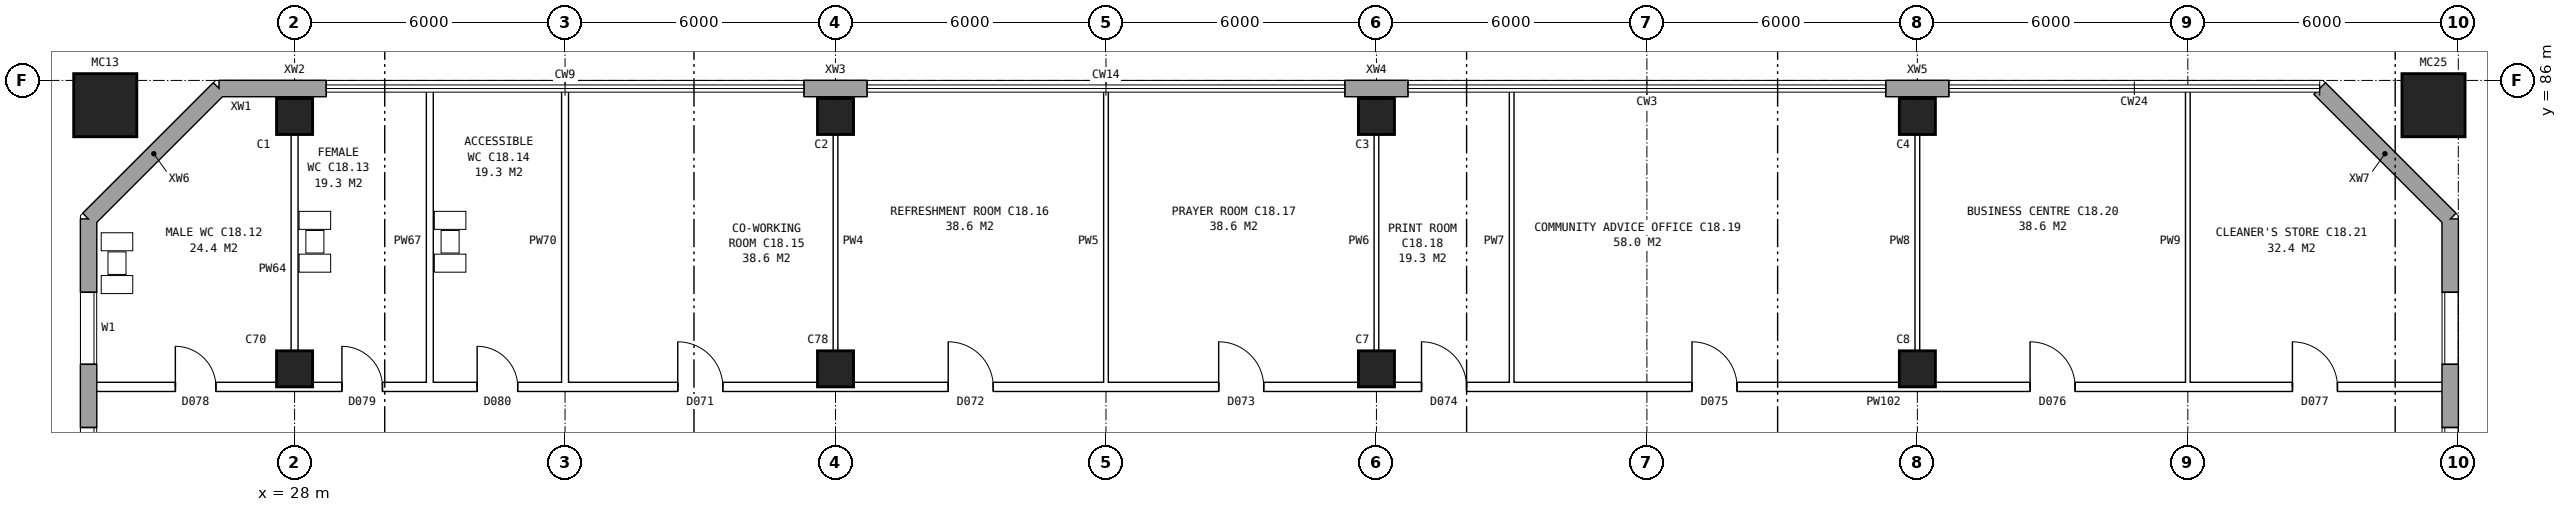
"""IFC4 building model, lengths in metres.
Left out: names, types, materials, properties, quantities, classifications, styles, units other than length and angle.
Written with IfcOpenShell. Run it as: python <this file> out.ifc"""

import sys

from ifc_helpers import new_model, si_unit, direction, frame, frame_2d, origin, origin_2d, place, context, subcontext, project, spatial, rectangle, hollow_rectangle, extrude, element, fill, save


model = new_model("IFC4")
c1 = context("Model", 3, precision=1e-05, world=origin(), true_north=direction((0.0, 1.0)))
c2 = subcontext(c1, "Body", "Model", "MODEL_VIEW")
j1 = project(units=[si_unit("LENGTHUNIT", "METRE"), si_unit("PLANEANGLEUNIT", "RADIAN")], contexts=[c1])
p1 = place(None, origin())
s1 = spatial("IfcSite", under=j1, at=p1, CompositionType="ELEMENT")
p2 = place(p1, origin())
s2 = spatial("IfcBuilding", under=s1, at=p2, CompositionType="ELEMENT")
p3 = place(p2, frame((0.0, 0.0, 67.4)))
s3 = spatial("IfcBuildingStorey", under=s2, at=p3, CompositionType="ELEMENT", Elevation=67.4)
for number, where, z_axis, x_axis in (
    (1, (28.0, 79.6, 0.0), (0.0, 0.0, 1.0), (1.0, 0.0, 0.0)),
    (2, (28.0, 85.2, 0.0), (0.0, 0.0, 1.0), (1.0, 0.0, 0.0)),
    (3, (40.0, 79.6, 0.0), (0.0, 0.0, 1.0), (1.0, 0.0, 0.0)),
    (4, (40.0, 85.2, 0.0), (0.0, 0.0, 1.0), (1.0, 0.0, 0.0)),
    (5, (52.0, 79.6, 0.0), (0.0, 0.0, 1.0), (1.0, 0.0, 0.0)),
    (6, (52.0, 85.2, 0.0), (0.0, 0.0, 1.0), (1.0, 0.0, 0.0)),
    (7, (64.0, 79.6, 0.0), (0.0, 0.0, 1.0), (1.0, 0.0, 0.0)),
    (8, (64.0, 85.2, 0.0), (0.0, 0.0, 1.0), (1.0, 0.0, 0.0)),
):
    element("IfcColumn", number, at=place(p3, frame(where, z_axis=z_axis, x_axis=x_axis)), inside=s3, PredefinedType="COLUMN", context=c2, shape_type="SweptSolid", body=[
        extrude(rectangle(XDim=0.8, YDim=0.8, at=origin_2d()), origin(), (0.0, 0.0, 1.0), 3.6),
    ])
for number, where, z_axis, x_axis in (
    (9, (75.45, 85.45, 0.0), (0.0, 0.0, 1.0), (1.0, 0.0, 0.0)),
    (10, (23.8, 85.45, 0.0), (0.0, 0.0, 1.0), (1.0, 0.0, 0.0)),
):
    element("IfcColumn", number, at=place(p3, frame(where, z_axis=z_axis, x_axis=x_axis)), inside=s3, PredefinedType="COLUMN", context=c2, shape_type="SweptSolid", body=[
        extrude(hollow_rectangle(XDim=1.4, YDim=1.4, WallThickness=0.075, at=origin_2d()), origin(), (0.0, 0.0, 1.0), 4.2),
    ])
p4 = place(p3, frame((75.82, 57.075, 0.0), z_axis=(0.0, 0.0, 1.0), x_axis=(0.0, 1.0, 0.0)))
e11 = element("IfcWall", 11, at=p4, inside=s3, PredefinedType="STANDARD", context=c2, shape_type="SweptSolid", body=[
    extrude(rectangle(XDim=25.851, YDim=0.36, at=frame_2d((12.925, 0.0))), origin(), (0.0, 0.0, 1.0), 3.6),
])
p5 = place(p4, frame((1.625, 0.0, 0.8)))
e12 = element("IfcOpeningElement", 12, at=p5, cuts=e11, PredefinedType="OPENING", context=c2, shape_type="SweptSolid", body=[
    extrude(rectangle(XDim=1.6, YDim=1.8, at=frame_2d((0.8, 0.9))), frame((0.0, 0.19, 0.0), z_axis=(0.0, -1.0, 0.0), x_axis=(1.0, 0.0, 0.0)), (0.0, 0.0, 1.0), 0.38),
])
p6 = place(p4, frame((4.625, 0.0, 0.8)))
e13 = element("IfcOpeningElement", 13, at=p6, cuts=e11, PredefinedType="OPENING", context=c2, shape_type="SweptSolid", body=[
    extrude(rectangle(XDim=1.6, YDim=1.8, at=frame_2d((0.8, 0.9))), frame((0.0, 0.19, 0.0), z_axis=(0.0, -1.0, 0.0), x_axis=(1.0, 0.0, 0.0)), (0.0, 0.0, 1.0), 0.38),
])
p7 = place(p4, frame((19.625, 0.0, 0.8)))
e14 = element("IfcOpeningElement", 14, at=p7, cuts=e11, PredefinedType="OPENING", context=c2, shape_type="SweptSolid", body=[
    extrude(rectangle(XDim=1.6, YDim=1.8, at=frame_2d((0.8, 0.9))), frame((0.0, 0.19, 0.0), z_axis=(0.0, -1.0, 0.0), x_axis=(1.0, 0.0, 0.0)), (0.0, 0.0, 1.0), 0.38),
])
p8 = place(p4, frame((22.625, 0.0, 0.8)))
e15 = element("IfcOpeningElement", 15, at=p8, cuts=e11, PredefinedType="OPENING", context=c2, shape_type="SweptSolid", body=[
    extrude(rectangle(XDim=1.6, YDim=1.8, at=frame_2d((0.8, 0.9))), frame((0.0, 0.19, 0.0), z_axis=(0.0, -1.0, 0.0), x_axis=(1.0, 0.0, 0.0)), (0.0, 0.0, 1.0), 0.38),
])
p9 = place(p3, frame((75.82, 82.925, 0.0), z_axis=(0.0, 0.0, 1.0), x_axis=(-0.707106781187, 0.707106781187, 0.0)))
e16 = element("IfcWall", 16, at=p9, inside=s3, PredefinedType="STANDARD", context=c2, shape_type="SweptSolid", body=[
    extrude(rectangle(XDim=4.094, YDim=0.36, at=frame_2d((2.047, 0.0))), origin(), (0.0, 0.0, 1.0), 3.6),
])
for number, where, z_axis, x_axis in (
    (17, (64.7, 85.82, 0.0), (0.0, 0.0, 1.0), (-1.0, 0.0, 0.0)),
    (18, (52.7, 85.82, 0.0), (0.0, 0.0, 1.0), (-1.0, 0.0, 0.0)),
    (19, (40.7, 85.82, 0.0), (0.0, 0.0, 1.0), (-1.0, 0.0, 0.0)),
    (20, (28.7, 85.82, 0.0), (0.0, 0.0, 1.0), (-1.0, 0.0, 0.0)),
):
    element("IfcWall", number, at=place(p3, frame(where, z_axis=z_axis, x_axis=x_axis)), inside=s3, PredefinedType="STANDARD", context=c2, shape_type="SweptSolid", body=[
        extrude(rectangle(XDim=1.4, YDim=0.36, at=frame_2d((0.7, 0.0))), origin(), (0.0, 0.0, 1.0), 3.6),
    ])
p10 = place(p3, frame((27.3, 85.82, 0.0), z_axis=(0.0, 0.0, 1.0), x_axis=(-1.0, 0.0, 0.0)))
e21 = element("IfcWall", 21, at=p10, inside=s3, PredefinedType="STANDARD", context=c2, shape_type="SweptSolid", body=[
    extrude(rectangle(XDim=0.976, YDim=0.36, at=frame_2d((0.488, 0.0))), origin(), (0.0, 0.0, 1.0), 3.6),
])
p11 = place(p3, frame((26.325, 85.82, 0.0), z_axis=(0.0, 0.0, 1.0), x_axis=(-0.707106781187, -0.707106781187, 0.0)))
e22 = element("IfcWall", 22, at=p11, inside=s3, PredefinedType="STANDARD", context=c2, shape_type="SweptSolid", body=[
    extrude(rectangle(XDim=4.094, YDim=0.36, at=frame_2d((2.047, 0.0))), origin(), (0.0, 0.0, 1.0), 3.6),
])
p12 = place(p3, frame((23.43, 82.925, 0.0), z_axis=(0.0, 0.0, 1.0), x_axis=(0.0, -1.0, 0.0)))
e23 = element("IfcWall", 23, at=p12, inside=s3, PredefinedType="STANDARD", context=c2, shape_type="SweptSolid", body=[
    extrude(rectangle(XDim=25.851, YDim=0.36, at=frame_2d((12.925, 0.0))), origin(), (0.0, 0.0, 1.0), 3.6),
])
p13 = place(p12, frame((1.625, 0.0, 0.8)))
e24 = element("IfcOpeningElement", 24, at=p13, cuts=e23, PredefinedType="OPENING", context=c2, shape_type="SweptSolid", body=[
    extrude(rectangle(XDim=1.6, YDim=1.8, at=frame_2d((0.8, 0.9))), frame((0.0, 0.19, 0.0), z_axis=(0.0, -1.0, 0.0), x_axis=(1.0, 0.0, 0.0)), (0.0, 0.0, 1.0), 0.38),
])
p14 = place(p12, frame((4.625, 0.0, 0.8)))
e25 = element("IfcOpeningElement", 25, at=p14, cuts=e23, PredefinedType="OPENING", context=c2, shape_type="SweptSolid", body=[
    extrude(rectangle(XDim=1.6, YDim=1.8, at=frame_2d((0.8, 0.9))), frame((0.0, 0.19, 0.0), z_axis=(0.0, -1.0, 0.0), x_axis=(1.0, 0.0, 0.0)), (0.0, 0.0, 1.0), 0.38),
])
p15 = place(p12, frame((7.625, 0.0, 0.8)))
e26 = element("IfcOpeningElement", 26, at=p15, cuts=e23, PredefinedType="OPENING", context=c2, shape_type="SweptSolid", body=[
    extrude(rectangle(XDim=1.6, YDim=1.8, at=frame_2d((0.8, 0.9))), frame((0.0, 0.19, 0.0), z_axis=(0.0, -1.0, 0.0), x_axis=(1.0, 0.0, 0.0)), (0.0, 0.0, 1.0), 0.38),
])
p16 = place(p12, frame((10.625, 0.0, 0.8)))
e27 = element("IfcOpeningElement", 27, at=p16, cuts=e23, PredefinedType="OPENING", context=c2, shape_type="SweptSolid", body=[
    extrude(rectangle(XDim=1.6, YDim=1.8, at=frame_2d((0.8, 0.9))), frame((0.0, 0.19, 0.0), z_axis=(0.0, -1.0, 0.0), x_axis=(1.0, 0.0, 0.0)), (0.0, 0.0, 1.0), 0.38),
])
p17 = place(p12, frame((13.625, 0.0, 0.8)))
e28 = element("IfcOpeningElement", 28, at=p17, cuts=e23, PredefinedType="OPENING", context=c2, shape_type="SweptSolid", body=[
    extrude(rectangle(XDim=1.6, YDim=1.8, at=frame_2d((0.8, 0.9))), frame((0.0, 0.19, 0.0), z_axis=(0.0, -1.0, 0.0), x_axis=(1.0, 0.0, 0.0)), (0.0, 0.0, 1.0), 0.38),
])
p18 = place(p12, frame((16.625, 0.0, 0.8)))
e29 = element("IfcOpeningElement", 29, at=p18, cuts=e23, PredefinedType="OPENING", context=c2, shape_type="SweptSolid", body=[
    extrude(rectangle(XDim=1.6, YDim=1.8, at=frame_2d((0.8, 0.9))), frame((0.0, 0.19, 0.0), z_axis=(0.0, -1.0, 0.0), x_axis=(1.0, 0.0, 0.0)), (0.0, 0.0, 1.0), 0.38),
])
p19 = place(p12, frame((19.625, 0.0, 0.8)))
e30 = element("IfcOpeningElement", 30, at=p19, cuts=e23, PredefinedType="OPENING", context=c2, shape_type="SweptSolid", body=[
    extrude(rectangle(XDim=1.6, YDim=1.8, at=frame_2d((0.8, 0.9))), frame((0.0, 0.19, 0.0), z_axis=(0.0, -1.0, 0.0), x_axis=(1.0, 0.0, 0.0)), (0.0, 0.0, 1.0), 0.38),
])
p20 = place(p12, frame((22.625, 0.0, 0.8)))
e31 = element("IfcOpeningElement", 31, at=p20, cuts=e23, PredefinedType="OPENING", context=c2, shape_type="SweptSolid", body=[
    extrude(rectangle(XDim=1.6, YDim=1.8, at=frame_2d((0.8, 0.9))), frame((0.0, 0.19, 0.0), z_axis=(0.0, -1.0, 0.0), x_axis=(1.0, 0.0, 0.0)), (0.0, 0.0, 1.0), 0.38),
])
p21 = place(p3, frame((23.49, 79.2, 0.0), z_axis=(0.0, 0.0, 1.0), x_axis=(1.0, 0.0, 0.0)))
e32 = element("IfcWall", 32, at=p21, inside=s3, PredefinedType="PARTITIONING", context=c2, shape_type="SweptSolid", body=[
    extrude(rectangle(XDim=52.27, YDim=0.2, at=frame_2d((26.135, 0.0))), origin(), (0.0, 0.0, 1.0), 3.6),
])
p22 = place(p21, frame((1.865, 0.0, 0.0)))
e33 = element("IfcOpeningElement", 33, at=p22, cuts=e32, PredefinedType="OPENING", context=c2, shape_type="SweptSolid", body=[
    extrude(rectangle(XDim=0.9, YDim=2.1, at=frame_2d((0.45, 1.05))), frame((0.0, 0.11, 0.0), z_axis=(0.0, -1.0, 0.0), x_axis=(1.0, 0.0, 0.0)), (0.0, 0.0, 1.0), 0.22),
])
p23 = place(p21, frame((5.56, 0.0, 0.0)))
e34 = element("IfcOpeningElement", 34, at=p23, cuts=e32, PredefinedType="OPENING", context=c2, shape_type="SweptSolid", body=[
    extrude(rectangle(XDim=0.9, YDim=2.1, at=frame_2d((0.45, 1.05))), frame((0.0, 0.11, 0.0), z_axis=(0.0, -1.0, 0.0), x_axis=(1.0, 0.0, 0.0)), (0.0, 0.0, 1.0), 0.22),
])
p24 = place(p21, frame((8.56, 0.0, 0.0)))
e35 = element("IfcOpeningElement", 35, at=p24, cuts=e32, PredefinedType="OPENING", context=c2, shape_type="SweptSolid", body=[
    extrude(rectangle(XDim=0.9, YDim=2.1, at=frame_2d((0.45, 1.05))), frame((0.0, 0.11, 0.0), z_axis=(0.0, -1.0, 0.0), x_axis=(1.0, 0.0, 0.0)), (0.0, 0.0, 1.0), 0.22),
])
p25 = place(p21, frame((13.01, 0.0, 0.0)))
e36 = element("IfcOpeningElement", 36, at=p25, cuts=e32, PredefinedType="OPENING", context=c2, shape_type="SweptSolid", body=[
    extrude(rectangle(XDim=1.0, YDim=2.1, at=frame_2d((0.5, 1.05))), frame((0.0, 0.11, 0.0), z_axis=(0.0, -1.0, 0.0), x_axis=(1.0, 0.0, 0.0)), (0.0, 0.0, 1.0), 0.22),
])
p26 = place(p21, frame((19.01, 0.0, 0.0)))
e37 = element("IfcOpeningElement", 37, at=p26, cuts=e32, PredefinedType="OPENING", context=c2, shape_type="SweptSolid", body=[
    extrude(rectangle(XDim=1.0, YDim=2.1, at=frame_2d((0.5, 1.05))), frame((0.0, 0.11, 0.0), z_axis=(0.0, -1.0, 0.0), x_axis=(1.0, 0.0, 0.0)), (0.0, 0.0, 1.0), 0.22),
])
p27 = place(p21, frame((25.01, 0.0, 0.0)))
e38 = element("IfcOpeningElement", 38, at=p27, cuts=e32, PredefinedType="OPENING", context=c2, shape_type="SweptSolid", body=[
    extrude(rectangle(XDim=1.0, YDim=2.1, at=frame_2d((0.5, 1.05))), frame((0.0, 0.11, 0.0), z_axis=(0.0, -1.0, 0.0), x_axis=(1.0, 0.0, 0.0)), (0.0, 0.0, 1.0), 0.22),
])
p28 = place(p21, frame((29.51, 0.0, 0.0)))
e39 = element("IfcOpeningElement", 39, at=p28, cuts=e32, PredefinedType="OPENING", context=c2, shape_type="SweptSolid", body=[
    extrude(rectangle(XDim=1.0, YDim=2.1, at=frame_2d((0.5, 1.05))), frame((0.0, 0.11, 0.0), z_axis=(0.0, -1.0, 0.0), x_axis=(1.0, 0.0, 0.0)), (0.0, 0.0, 1.0), 0.22),
])
p29 = place(p21, frame((35.51, 0.0, 0.0)))
e40 = element("IfcOpeningElement", 40, at=p29, cuts=e32, PredefinedType="OPENING", context=c2, shape_type="SweptSolid", body=[
    extrude(rectangle(XDim=1.0, YDim=2.1, at=frame_2d((0.5, 1.05))), frame((0.0, 0.11, 0.0), z_axis=(0.0, -1.0, 0.0), x_axis=(1.0, 0.0, 0.0)), (0.0, 0.0, 1.0), 0.22),
])
p30 = place(p21, frame((43.01, 0.0, 0.0)))
e41 = element("IfcOpeningElement", 41, at=p30, cuts=e32, PredefinedType="OPENING", context=c2, shape_type="SweptSolid", body=[
    extrude(rectangle(XDim=1.0, YDim=2.1, at=frame_2d((0.5, 1.05))), frame((0.0, 0.11, 0.0), z_axis=(0.0, -1.0, 0.0), x_axis=(1.0, 0.0, 0.0)), (0.0, 0.0, 1.0), 0.22),
])
p31 = place(p21, frame((48.83, 0.0, 0.0)))
e42 = element("IfcOpeningElement", 42, at=p31, cuts=e32, PredefinedType="OPENING", context=c2, shape_type="SweptSolid", body=[
    extrude(rectangle(XDim=1.0, YDim=2.1, at=frame_2d((0.5, 1.05))), frame((0.0, 0.11, 0.0), z_axis=(0.0, -1.0, 0.0), x_axis=(1.0, 0.0, 0.0)), (0.0, 0.0, 1.0), 0.22),
])
for number, where, z_axis, x_axis in (
    (43, (28.0, 79.1, 0.0), (0.0, 0.0, 1.0), (0.0, 1.0, 0.0)),
    (44, (31.0, 79.1, 0.0), (0.0, 0.0, 1.0), (0.0, 1.0, 0.0)),
    (45, (34.0, 79.1, 0.0), (0.0, 0.0, 1.0), (0.0, 1.0, 0.0)),
):
    element("IfcWall", number, at=place(p3, frame(where, z_axis=z_axis, x_axis=x_axis)), inside=s3, PredefinedType="PLUMBINGWALL", context=c2, shape_type="SweptSolid", body=[
        extrude(rectangle(XDim=6.66, YDim=0.15, at=frame_2d((3.33, 0.0))), origin(), (0.0, 0.0, 1.0), 3.6),
    ])
for number, where, z_axis, x_axis in (
    (46, (40.0, 79.1, 0.0), (0.0, 0.0, 1.0), (0.0, 1.0, 0.0)),
    (47, (46.0, 79.1, 0.0), (0.0, 0.0, 1.0), (0.0, 1.0, 0.0)),
    (48, (52.0, 79.1, 0.0), (0.0, 0.0, 1.0), (0.0, 1.0, 0.0)),
    (49, (55.0, 79.1, 0.0), (0.0, 0.0, 1.0), (0.0, 1.0, 0.0)),
    (50, (64.0, 79.1, 0.0), (0.0, 0.0, 1.0), (0.0, 1.0, 0.0)),
    (51, (70.0, 79.1, 0.0), (0.0, 0.0, 1.0), (0.0, 1.0, 0.0)),
):
    element("IfcWall", number, at=place(p3, frame(where, z_axis=z_axis, x_axis=x_axis)), inside=s3, PredefinedType="PARTITIONING", context=c2, shape_type="SweptSolid", body=[
        extrude(rectangle(XDim=6.66, YDim=0.1, at=frame_2d((3.33, 0.0))), origin(), (0.0, 0.0, 1.0), 3.6),
    ])
p32 = place(p7, origin())
e52 = element("IfcWindow", 52, at=p32, inside=s3, PartitioningType="SINGLE_PANEL", PredefinedType="WINDOW", context=c2, shape_type="SweptSolid", body=[
    extrude(rectangle(XDim=1.6, YDim=1.8, at=frame_2d((0.8, 0.9))), frame((0.0, 0.15, 0.0), z_axis=(0.0, -1.0, 0.0), x_axis=(1.0, 0.0, 0.0)), (0.0, 0.0, 1.0), 0.06),
])
fill(e14, e52)
p33 = place(p8, origin())
e53 = element("IfcWindow", 53, at=p33, inside=s3, PartitioningType="SINGLE_PANEL", PredefinedType="WINDOW", context=c2, shape_type="SweptSolid", body=[
    extrude(rectangle(XDim=1.6, YDim=1.8, at=frame_2d((0.8, 0.9))), frame((0.0, 0.15, 0.0), z_axis=(0.0, -1.0, 0.0), x_axis=(1.0, 0.0, 0.0)), (0.0, 0.0, 1.0), 0.06),
])
fill(e15, e53)
p34 = place(p13, origin())
e54 = element("IfcWindow", 54, at=p34, inside=s3, PartitioningType="SINGLE_PANEL", PredefinedType="WINDOW", context=c2, shape_type="SweptSolid", body=[
    extrude(rectangle(XDim=1.6, YDim=1.8, at=frame_2d((0.8, 0.9))), frame((0.0, 0.15, 0.0), z_axis=(0.0, -1.0, 0.0), x_axis=(1.0, 0.0, 0.0)), (0.0, 0.0, 1.0), 0.06),
])
fill(e24, e54)
p35 = place(p14, origin())
e55 = element("IfcWindow", 55, at=p35, inside=s3, PartitioningType="SINGLE_PANEL", PredefinedType="WINDOW", context=c2, shape_type="SweptSolid", body=[
    extrude(rectangle(XDim=1.6, YDim=1.8, at=frame_2d((0.8, 0.9))), frame((0.0, 0.15, 0.0), z_axis=(0.0, -1.0, 0.0), x_axis=(1.0, 0.0, 0.0)), (0.0, 0.0, 1.0), 0.06),
])
fill(e25, e55)
p36 = place(p22, origin())
e56 = element("IfcDoor", 56, at=p36, inside=s3, OperationType="SINGLE_SWING_LEFT", PredefinedType="DOOR", context=c2, shape_type="SweptSolid", body=[
    extrude(rectangle(XDim=0.9, YDim=2.1, at=frame_2d((0.45, 1.05))), frame((0.0, 0.025, 0.0), z_axis=(0.0, -1.0, 0.0), x_axis=(1.0, 0.0, 0.0)), (0.0, 0.0, 1.0), 0.05),
])
fill(e33, e56)
p37 = place(p23, origin())
e57 = element("IfcDoor", 57, at=p37, inside=s3, OperationType="SINGLE_SWING_LEFT", PredefinedType="DOOR", context=c2, shape_type="SweptSolid", body=[
    extrude(rectangle(XDim=0.9, YDim=2.1, at=frame_2d((0.45, 1.05))), frame((0.0, 0.025, 0.0), z_axis=(0.0, -1.0, 0.0), x_axis=(1.0, 0.0, 0.0)), (0.0, 0.0, 1.0), 0.05),
])
fill(e34, e57)
p38 = place(p24, origin())
e58 = element("IfcDoor", 58, at=p38, inside=s3, OperationType="SINGLE_SWING_LEFT", PredefinedType="DOOR", context=c2, shape_type="SweptSolid", body=[
    extrude(rectangle(XDim=0.9, YDim=2.1, at=frame_2d((0.45, 1.05))), frame((0.0, 0.025, 0.0), z_axis=(0.0, -1.0, 0.0), x_axis=(1.0, 0.0, 0.0)), (0.0, 0.0, 1.0), 0.05),
])
fill(e35, e58)
p39 = place(p25, origin())
e59 = element("IfcDoor", 59, at=p39, inside=s3, OperationType="SINGLE_SWING_LEFT", PredefinedType="DOOR", context=c2, shape_type="SweptSolid", body=[
    extrude(rectangle(XDim=1.0, YDim=2.1, at=frame_2d((0.5, 1.05))), frame((0.0, 0.025, 0.0), z_axis=(0.0, -1.0, 0.0), x_axis=(1.0, 0.0, 0.0)), (0.0, 0.0, 1.0), 0.05),
])
fill(e36, e59)
p40 = place(p26, origin())
e60 = element("IfcDoor", 60, at=p40, inside=s3, OperationType="SINGLE_SWING_LEFT", PredefinedType="DOOR", context=c2, shape_type="SweptSolid", body=[
    extrude(rectangle(XDim=1.0, YDim=2.1, at=frame_2d((0.5, 1.05))), frame((0.0, 0.025, 0.0), z_axis=(0.0, -1.0, 0.0), x_axis=(1.0, 0.0, 0.0)), (0.0, 0.0, 1.0), 0.05),
])
fill(e37, e60)
p41 = place(p27, origin())
e61 = element("IfcDoor", 61, at=p41, inside=s3, OperationType="SINGLE_SWING_LEFT", PredefinedType="DOOR", context=c2, shape_type="SweptSolid", body=[
    extrude(rectangle(XDim=1.0, YDim=2.1, at=frame_2d((0.5, 1.05))), frame((0.0, 0.025, 0.0), z_axis=(0.0, -1.0, 0.0), x_axis=(1.0, 0.0, 0.0)), (0.0, 0.0, 1.0), 0.05),
])
fill(e38, e61)
p42 = place(p28, origin())
e62 = element("IfcDoor", 62, at=p42, inside=s3, OperationType="SINGLE_SWING_LEFT", PredefinedType="DOOR", context=c2, shape_type="SweptSolid", body=[
    extrude(rectangle(XDim=1.0, YDim=2.1, at=frame_2d((0.5, 1.05))), frame((0.0, 0.025, 0.0), z_axis=(0.0, -1.0, 0.0), x_axis=(1.0, 0.0, 0.0)), (0.0, 0.0, 1.0), 0.05),
])
fill(e39, e62)
p43 = place(p29, origin())
e63 = element("IfcDoor", 63, at=p43, inside=s3, OperationType="SINGLE_SWING_LEFT", PredefinedType="DOOR", context=c2, shape_type="SweptSolid", body=[
    extrude(rectangle(XDim=1.0, YDim=2.1, at=frame_2d((0.5, 1.05))), frame((0.0, 0.025, 0.0), z_axis=(0.0, -1.0, 0.0), x_axis=(1.0, 0.0, 0.0)), (0.0, 0.0, 1.0), 0.05),
])
fill(e40, e63)
p44 = place(p30, origin())
e64 = element("IfcDoor", 64, at=p44, inside=s3, OperationType="SINGLE_SWING_LEFT", PredefinedType="DOOR", context=c2, shape_type="SweptSolid", body=[
    extrude(rectangle(XDim=1.0, YDim=2.1, at=frame_2d((0.5, 1.05))), frame((0.0, 0.025, 0.0), z_axis=(0.0, -1.0, 0.0), x_axis=(1.0, 0.0, 0.0)), (0.0, 0.0, 1.0), 0.05),
])
fill(e41, e64)
p45 = place(p31, origin())
e65 = element("IfcDoor", 65, at=p45, inside=s3, OperationType="SINGLE_SWING_LEFT", PredefinedType="DOOR", context=c2, shape_type="SweptSolid", body=[
    extrude(rectangle(XDim=1.0, YDim=2.1, at=frame_2d((0.5, 1.05))), frame((0.0, 0.025, 0.0), z_axis=(0.0, -1.0, 0.0), x_axis=(1.0, 0.0, 0.0)), (0.0, 0.0, 1.0), 0.05),
])
fill(e42, e65)
save(model, sys.argv[1])
